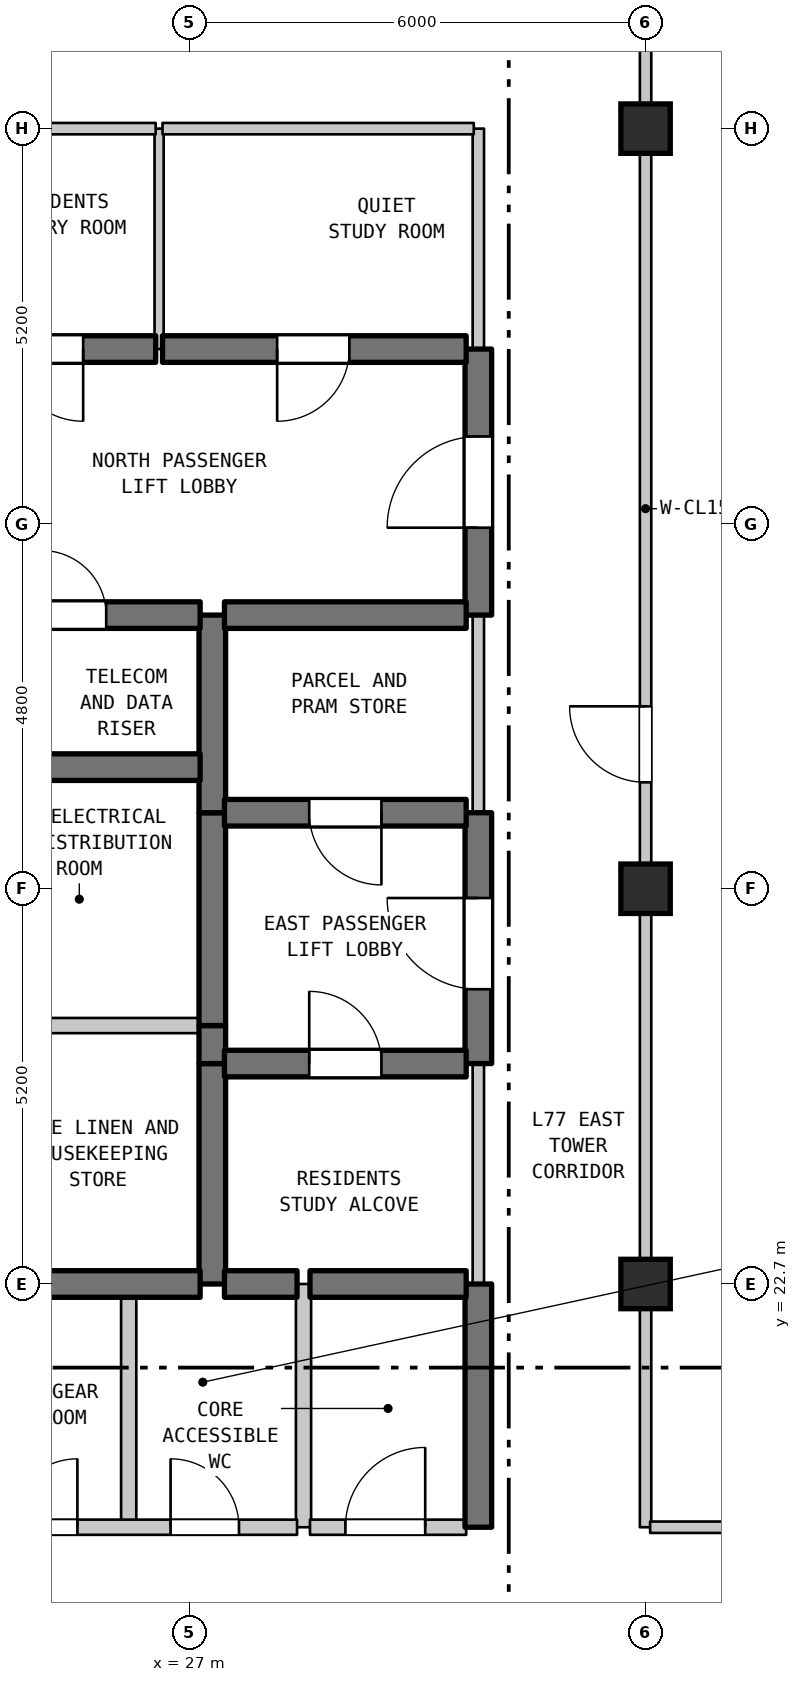
"""IFC4 building model, lengths in metres.
Left out: names, types, materials, properties, quantities, classifications, styles, units other than length and angle.
Written with IfcOpenShell. Run it as: python <this file> out.ifc"""

import sys

from ifc_helpers import new_model, si_unit, direction, frame, frame_2d, origin, origin_2d, place, context, subcontext, project, spatial, rectangle, extrude, element, fill, save


model = new_model("IFC4")
c1 = context("Model", 3, precision=1e-05, world=origin(), true_north=direction((0.0, 1.0)))
c2 = subcontext(c1, "Body", "Model", "MODEL_VIEW")
j1 = project(units=[si_unit("LENGTHUNIT", "METRE"), si_unit("PLANEANGLEUNIT", "RADIAN")], contexts=[c1])
p1 = place(None, origin())
s1 = spatial("IfcSite", under=j1, at=p1, CompositionType="ELEMENT")
p2 = place(p1, origin())
s2 = spatial("IfcBuilding", under=s1, at=p2, CompositionType="ELEMENT")
p3 = place(p2, frame((0.0, 0.0, 307.3)))
s3 = spatial("IfcBuildingStorey", under=s2, at=p3, CompositionType="ELEMENT", Elevation=307.3)
for number, where, z_axis, x_axis in (
    (1, (33.0, 22.7, 0.0), (0.0, 0.0, 1.0), (1.0, 0.0, 0.0)),
    (2, (33.0, 27.9, 0.0), (0.0, 0.0, 1.0), (1.0, 0.0, 0.0)),
    (3, (33.0, 37.9, 0.0), (0.0, 0.0, 1.0), (1.0, 0.0, 0.0)),
):
    element("IfcColumn", number, at=place(p3, frame(where, z_axis=z_axis, x_axis=x_axis)), inside=s3, PredefinedType="COLUMN", context=c2, shape_type="SweptSolid", body=[
        extrude(rectangle(XDim=0.65, YDim=0.65, at=origin_2d()), origin(), (0.0, 0.0, 1.0), 3.7),
    ])
p4 = place(p3, frame((26.2, 19.5, 0.0), z_axis=(0.0, 0.0, 1.0), x_axis=(0.0, 1.0, 0.0)))
e4 = element("IfcWall", 4, at=p4, inside=s3, PredefinedType="STANDARD", context=c2, shape_type="SweptSolid", body=[
    extrude(rectangle(XDim=3.2, YDim=0.2, at=frame_2d((1.6, 0.0))), origin(), (0.0, 0.0, 1.0), 3.39),
])
p5 = place(p3, frame((26.6, 35.0, 0.0), z_axis=(0.0, 0.0, 1.0), x_axis=(0.0, 1.0, 0.0)))
e5 = element("IfcWall", 5, at=p5, inside=s3, PredefinedType="PARTITIONING", context=c2, shape_type="SweptSolid", body=[
    extrude(rectangle(XDim=2.9, YDim=0.12, at=frame_2d((1.45, 0.0))), origin(), (0.0, 0.0, 1.0), 3.39),
])
p6 = place(p3, frame((27.3, 22.7, 0.0), z_axis=(0.0, 0.0, 1.0), x_axis=(0.0, 1.0, 0.0)))
e6 = element("IfcWall", 6, at=p6, inside=s3, PredefinedType="SHEAR", context=c2, shape_type="SweptSolid", body=[
    extrude(rectangle(XDim=2.9, YDim=0.35, at=frame_2d((1.45, 0.0))), origin(), (0.0, 0.0, 1.0), 3.39),
])
p7 = place(p3, frame((27.3, 25.6, 0.0), z_axis=(0.0, 0.0, 1.0), x_axis=(0.0, 1.0, 0.0)))
e7 = element("IfcWall", 7, at=p7, inside=s3, PredefinedType="SHEAR", context=c2, shape_type="SweptSolid", body=[
    extrude(rectangle(XDim=0.5, YDim=0.35, at=frame_2d((0.25, 0.0))), origin(), (0.0, 0.0, 1.0), 3.39),
])
p8 = place(p3, frame((27.3, 26.1, 0.0), z_axis=(0.0, 0.0, 1.0), x_axis=(0.0, 1.0, 0.0)))
e8 = element("IfcWall", 8, at=p8, inside=s3, PredefinedType="SHEAR", context=c2, shape_type="SweptSolid", body=[
    extrude(rectangle(XDim=2.8, YDim=0.35, at=frame_2d((1.4, 0.0))), origin(), (0.0, 0.0, 1.0), 3.39),
])
p9 = place(p3, frame((27.3, 28.9, 0.0), z_axis=(0.0, 0.0, 1.0), x_axis=(0.0, 1.0, 0.0)))
e9 = element("IfcWall", 9, at=p9, inside=s3, PredefinedType="SHEAR", context=c2, shape_type="SweptSolid", body=[
    extrude(rectangle(XDim=2.6, YDim=0.35, at=frame_2d((1.3, 0.0))), origin(), (0.0, 0.0, 1.0), 3.39),
])
p10 = place(p3, frame((28.5, 19.5, 0.0), z_axis=(0.0, 0.0, 1.0), x_axis=(0.0, 1.0, 0.0)))
e10 = element("IfcWall", 10, at=p10, inside=s3, PredefinedType="STANDARD", context=c2, shape_type="SweptSolid", body=[
    extrude(rectangle(XDim=3.2, YDim=0.2, at=frame_2d((1.6, 0.0))), origin(), (0.0, 0.0, 1.0), 3.39),
])
p11 = place(p3, frame((30.8, 19.5, 0.0), z_axis=(0.0, 0.0, 1.0), x_axis=(0.0, 1.0, 0.0)))
e11 = element("IfcWall", 11, at=p11, inside=s3, PredefinedType="SHEAR", context=c2, shape_type="SweptSolid", body=[
    extrude(rectangle(XDim=3.2, YDim=0.35, at=frame_2d((1.6, 0.0))), origin(), (0.0, 0.0, 1.0), 3.39),
])
p12 = place(p3, frame((30.8, 22.7, 0.0), z_axis=(0.0, 0.0, 1.0), x_axis=(0.0, 1.0, 0.0)))
e12 = element("IfcWall", 12, at=p12, inside=s3, PredefinedType="STANDARD", context=c2, shape_type="SweptSolid", body=[
    extrude(rectangle(XDim=2.9, YDim=0.15, at=frame_2d((1.45, 0.0))), origin(), (0.0, 0.0, 1.0), 3.39),
])
p13 = place(p3, frame((30.8, 25.6, 0.0), z_axis=(0.0, 0.0, 1.0), x_axis=(0.0, 1.0, 0.0)))
e13 = element("IfcWall", 13, at=p13, inside=s3, PredefinedType="SHEAR", context=c2, shape_type="SweptSolid", body=[
    extrude(rectangle(XDim=3.3, YDim=0.35, at=frame_2d((1.65, 0.0))), origin(), (0.0, 0.0, 1.0), 3.39),
])
p14 = place(p13, frame((0.978, 0.0, 0.0)))
e14 = element("IfcOpeningElement", 14, at=p14, cuts=e13, PredefinedType="OPENING", context=c2, shape_type="SweptSolid", body=[
    extrude(rectangle(XDim=1.2, YDim=2.2, at=frame_2d((0.6, 1.1))), frame((0.0, 0.185, 0.0), z_axis=(0.0, -1.0, 0.0), x_axis=(1.0, 0.0, 0.0)), (0.0, 0.0, 1.0), 0.37),
])
p15 = place(p3, frame((30.8, 28.9, 0.0), z_axis=(0.0, 0.0, 1.0), x_axis=(0.0, 1.0, 0.0)))
e15 = element("IfcWall", 15, at=p15, inside=s3, PredefinedType="STANDARD", context=c2, shape_type="SweptSolid", body=[
    extrude(rectangle(XDim=2.6, YDim=0.15, at=frame_2d((1.3, 0.0))), origin(), (0.0, 0.0, 1.0), 3.39),
])
p16 = place(p3, frame((30.8, 31.5, 0.0), z_axis=(0.0, 0.0, 1.0), x_axis=(0.0, 1.0, 0.0)))
e16 = element("IfcWall", 16, at=p16, inside=s3, PredefinedType="SHEAR", context=c2, shape_type="SweptSolid", body=[
    extrude(rectangle(XDim=3.5, YDim=0.35, at=frame_2d((1.75, 0.0))), origin(), (0.0, 0.0, 1.0), 3.39),
])
p17 = place(p16, frame((1.15, 0.0, 0.0)))
e17 = element("IfcOpeningElement", 17, at=p17, cuts=e16, PredefinedType="OPENING", context=c2, shape_type="SweptSolid", body=[
    extrude(rectangle(XDim=1.2, YDim=2.2, at=frame_2d((0.6, 1.1))), frame((0.0, 0.185, 0.0), z_axis=(0.0, -1.0, 0.0), x_axis=(1.0, 0.0, 0.0)), (0.0, 0.0, 1.0), 0.37),
])
p18 = place(p3, frame((30.8, 35.0, 0.0), z_axis=(0.0, 0.0, 1.0), x_axis=(0.0, 1.0, 0.0)))
e18 = element("IfcWall", 18, at=p18, inside=s3, PredefinedType="STANDARD", context=c2, shape_type="SweptSolid", body=[
    extrude(rectangle(XDim=2.9, YDim=0.15, at=frame_2d((1.45, 0.0))), origin(), (0.0, 0.0, 1.0), 3.39),
])
p19 = place(p3, frame((33.0, 19.5, 0.0), z_axis=(0.0, 0.0, 1.0), x_axis=(0.0, 1.0, 0.0)))
e19 = element("IfcWall", 19, at=p19, inside=s3, PredefinedType="STANDARD", context=c2, shape_type="SweptSolid", body=[
    extrude(rectangle(XDim=8.4, YDim=0.15, at=frame_2d((4.2, 0.0))), origin(), (0.0, 0.0, 1.0), 3.1),
])
p20 = place(p3, frame((23.96, 19.5, 0.0), z_axis=(0.0, 0.0, 1.0), x_axis=(1.0, 0.0, 0.0)))
e20 = element("IfcWall", 20, at=p20, inside=s3, PredefinedType="STANDARD", context=c2, shape_type="SweptSolid", body=[
    extrude(rectangle(XDim=4.455, YDim=0.2, at=frame_2d((2.228, 0.0))), origin(), (0.0, 0.0, 1.0), 3.39),
])
p21 = place(p20, frame((0.665, 0.0, 0.0)))
e21 = element("IfcOpeningElement", 21, at=p21, cuts=e20, PredefinedType="OPENING", context=c2, shape_type="SweptSolid", body=[
    extrude(rectangle(XDim=0.9, YDim=2.15, at=frame_2d((0.45, 1.075))), frame((0.0, 0.11, 0.0), z_axis=(0.0, -1.0, 0.0), x_axis=(1.0, 0.0, 0.0)), (0.0, 0.0, 1.0), 0.22),
])
p22 = place(p20, frame((2.791, 0.0, 0.0)))
e22 = element("IfcOpeningElement", 22, at=p22, cuts=e20, PredefinedType="OPENING", context=c2, shape_type="SweptSolid", body=[
    extrude(rectangle(XDim=0.9, YDim=2.15, at=frame_2d((0.45, 1.075))), frame((0.0, 0.11, 0.0), z_axis=(0.0, -1.0, 0.0), x_axis=(1.0, 0.0, 0.0)), (0.0, 0.0, 1.0), 0.22),
])
p23 = place(p3, frame((28.585, 19.5, 0.0), z_axis=(0.0, 0.0, 1.0), x_axis=(1.0, 0.0, 0.0)))
e23 = element("IfcWall", 23, at=p23, inside=s3, PredefinedType="STANDARD", context=c2, shape_type="SweptSolid", body=[
    extrude(rectangle(XDim=2.055, YDim=0.2, at=frame_2d((1.027, 0.0))), origin(), (0.0, 0.0, 1.0), 3.39),
])
p24 = place(p23, frame((0.466, 0.0, 0.0)))
e24 = element("IfcOpeningElement", 24, at=p24, cuts=e23, PredefinedType="OPENING", context=c2, shape_type="SweptSolid", body=[
    extrude(rectangle(XDim=1.05, YDim=2.15, at=frame_2d((0.525, 1.075))), frame((0.0, 0.11, 0.0), z_axis=(0.0, -1.0, 0.0), x_axis=(1.0, 0.0, 0.0)), (0.0, 0.0, 1.0), 0.22),
])
p25 = place(p3, frame((33.06, 19.5, 0.0), z_axis=(0.0, 0.0, 1.0), x_axis=(1.0, 0.0, 0.0)))
e25 = element("IfcWall", 25, at=p25, inside=s3, PredefinedType="STANDARD", context=c2, shape_type="SweptSolid", body=[
    extrude(rectangle(XDim=8.323, YDim=0.15, at=frame_2d((4.162, 0.0))), origin(), (0.0, 0.0, 1.0), 3.39),
])
p26 = place(p25, frame((3.583, 0.0, 0.0)))
e26 = element("IfcOpeningElement", 26, at=p26, cuts=e25, PredefinedType="OPENING", context=c2, shape_type="SweptSolid", body=[
    extrude(rectangle(XDim=1.0, YDim=2.15, at=frame_2d((0.5, 1.075))), frame((0.0, 0.085, 0.0), z_axis=(0.0, -1.0, 0.0), x_axis=(1.0, 0.0, 0.0)), (0.0, 0.0, 1.0), 0.17),
])
p27 = place(p3, frame((23.96, 22.7, 0.0), z_axis=(0.0, 0.0, 1.0), x_axis=(1.0, 0.0, 0.0)))
e27 = element("IfcWall", 27, at=p27, inside=s3, PredefinedType="SHEAR", context=c2, shape_type="SweptSolid", body=[
    extrude(rectangle(XDim=3.18, YDim=0.35, at=frame_2d((1.59, 0.0))), origin(), (0.0, 0.0, 1.0), 3.39),
])
p28 = place(p3, frame((27.46, 22.7, 0.0), z_axis=(0.0, 0.0, 1.0), x_axis=(1.0, 0.0, 0.0)))
e28 = element("IfcWall", 28, at=p28, inside=s3, PredefinedType="SHEAR", context=c2, shape_type="SweptSolid", body=[
    extrude(rectangle(XDim=0.955, YDim=0.35, at=frame_2d((0.478, 0.0))), origin(), (0.0, 0.0, 1.0), 3.39),
])
p29 = place(p3, frame((28.585, 22.7, 0.0), z_axis=(0.0, 0.0, 1.0), x_axis=(1.0, 0.0, 0.0)))
e29 = element("IfcWall", 29, at=p29, inside=s3, PredefinedType="SHEAR", context=c2, shape_type="SweptSolid", body=[
    extrude(rectangle(XDim=2.055, YDim=0.35, at=frame_2d((1.027, 0.0))), origin(), (0.0, 0.0, 1.0), 3.39),
])
p30 = place(p3, frame((27.46, 25.6, 0.0), z_axis=(0.0, 0.0, 1.0), x_axis=(1.0, 0.0, 0.0)))
e30 = element("IfcWall", 30, at=p30, inside=s3, PredefinedType="SHEAR", context=c2, shape_type="SweptSolid", body=[
    extrude(rectangle(XDim=3.18, YDim=0.35, at=frame_2d((1.59, 0.0))), origin(), (0.0, 0.0, 1.0), 3.39),
])
p31 = place(p30, frame((1.115, 0.0, 0.0)))
e31 = element("IfcOpeningElement", 31, at=p31, cuts=e30, PredefinedType="OPENING", context=c2, shape_type="SweptSolid", body=[
    extrude(rectangle(XDim=0.95, YDim=2.15, at=frame_2d((0.475, 1.075))), frame((0.0, 0.185, 0.0), z_axis=(0.0, -1.0, 0.0), x_axis=(1.0, 0.0, 0.0)), (0.0, 0.0, 1.0), 0.37),
])
p32 = place(p3, frame((23.96, 26.1, 0.0), z_axis=(0.0, 0.0, 1.0), x_axis=(1.0, 0.0, 0.0)))
e32 = element("IfcWall", 32, at=p32, inside=s3, PredefinedType="STANDARD", context=c2, shape_type="SweptSolid", body=[
    extrude(rectangle(XDim=3.18, YDim=0.2, at=frame_2d((1.59, 0.0))), origin(), (0.0, 0.0, 1.0), 3.39),
])
p33 = place(p3, frame((27.46, 28.9, 0.0), z_axis=(0.0, 0.0, 1.0), x_axis=(1.0, 0.0, 0.0)))
e33 = element("IfcWall", 33, at=p33, inside=s3, PredefinedType="SHEAR", context=c2, shape_type="SweptSolid", body=[
    extrude(rectangle(XDim=3.18, YDim=0.35, at=frame_2d((1.59, 0.0))), origin(), (0.0, 0.0, 1.0), 3.39),
])
p34 = place(p33, frame((1.115, 0.0, 0.0)))
e34 = element("IfcOpeningElement", 34, at=p34, cuts=e33, PredefinedType="OPENING", context=c2, shape_type="SweptSolid", body=[
    extrude(rectangle(XDim=0.95, YDim=2.15, at=frame_2d((0.475, 1.075))), frame((0.0, 0.185, 0.0), z_axis=(0.0, -1.0, 0.0), x_axis=(1.0, 0.0, 0.0)), (0.0, 0.0, 1.0), 0.37),
])
p35 = place(p3, frame((23.96, 29.5, 0.0), z_axis=(0.0, 0.0, 1.0), x_axis=(1.0, 0.0, 0.0)))
e35 = element("IfcWall", 35, at=p35, inside=s3, PredefinedType="SHEAR", context=c2, shape_type="SweptSolid", body=[
    extrude(rectangle(XDim=3.18, YDim=0.35, at=frame_2d((1.59, 0.0))), origin(), (0.0, 0.0, 1.0), 3.39),
])
p36 = place(p3, frame((23.96, 31.5, 0.0), z_axis=(0.0, 0.0, 1.0), x_axis=(1.0, 0.0, 0.0)))
e36 = element("IfcWall", 36, at=p36, inside=s3, PredefinedType="SHEAR", context=c2, shape_type="SweptSolid", body=[
    extrude(rectangle(XDim=3.18, YDim=0.35, at=frame_2d((1.59, 0.0))), origin(), (0.0, 0.0, 1.0), 3.39),
])
p37 = place(p36, frame((1.094, 0.0, 0.0)))
e37 = element("IfcOpeningElement", 37, at=p37, cuts=e36, PredefinedType="OPENING", context=c2, shape_type="SweptSolid", body=[
    extrude(rectangle(XDim=0.85, YDim=2.1, at=frame_2d((0.425, 1.05))), frame((0.0, 0.185, 0.0), z_axis=(0.0, -1.0, 0.0), x_axis=(1.0, 0.0, 0.0)), (0.0, 0.0, 1.0), 0.37),
])
p38 = place(p3, frame((27.46, 31.5, 0.0), z_axis=(0.0, 0.0, 1.0), x_axis=(1.0, 0.0, 0.0)))
e38 = element("IfcWall", 38, at=p38, inside=s3, PredefinedType="SHEAR", context=c2, shape_type="SweptSolid", body=[
    extrude(rectangle(XDim=3.18, YDim=0.35, at=frame_2d((1.59, 0.0))), origin(), (0.0, 0.0, 1.0), 3.39),
])
p39 = place(p3, frame((23.96, 35.0, 0.0), z_axis=(0.0, 0.0, 1.0), x_axis=(1.0, 0.0, 0.0)))
e39 = element("IfcWall", 39, at=p39, inside=s3, PredefinedType="SHEAR", context=c2, shape_type="SweptSolid", body=[
    extrude(rectangle(XDim=2.595, YDim=0.35, at=frame_2d((1.297, 0.0))), origin(), (0.0, 0.0, 1.0), 3.39),
])
p40 = place(p39, frame((0.691, 0.0, 0.0)))
e40 = element("IfcOpeningElement", 40, at=p40, cuts=e39, PredefinedType="OPENING", context=c2, shape_type="SweptSolid", body=[
    extrude(rectangle(XDim=0.95, YDim=2.15, at=frame_2d((0.475, 1.075))), frame((0.0, 0.185, 0.0), z_axis=(0.0, -1.0, 0.0), x_axis=(1.0, 0.0, 0.0)), (0.0, 0.0, 1.0), 0.37),
])
p41 = place(p3, frame((26.645, 35.0, 0.0), z_axis=(0.0, 0.0, 1.0), x_axis=(1.0, 0.0, 0.0)))
e41 = element("IfcWall", 41, at=p41, inside=s3, PredefinedType="SHEAR", context=c2, shape_type="SweptSolid", body=[
    extrude(rectangle(XDim=3.995, YDim=0.35, at=frame_2d((1.998, 0.0))), origin(), (0.0, 0.0, 1.0), 3.39),
])
p42 = place(p41, frame((1.508, 0.0, 0.0)))
e42 = element("IfcOpeningElement", 42, at=p42, cuts=e41, PredefinedType="OPENING", context=c2, shape_type="SweptSolid", body=[
    extrude(rectangle(XDim=0.95, YDim=2.15, at=frame_2d((0.475, 1.075))), frame((0.0, 0.185, 0.0), z_axis=(0.0, -1.0, 0.0), x_axis=(1.0, 0.0, 0.0)), (0.0, 0.0, 1.0), 0.37),
])
p43 = place(p3, frame((23.96, 37.9, 0.0), z_axis=(0.0, 0.0, 1.0), x_axis=(1.0, 0.0, 0.0)))
e43 = element("IfcWall", 43, at=p43, inside=s3, PredefinedType="STANDARD", context=c2, shape_type="SweptSolid", body=[
    extrude(rectangle(XDim=2.595, YDim=0.15, at=frame_2d((1.297, 0.0))), origin(), (0.0, 0.0, 1.0), 2.89),
])
p44 = place(p3, frame((26.645, 37.9, 0.0), z_axis=(0.0, 0.0, 1.0), x_axis=(1.0, 0.0, 0.0)))
e44 = element("IfcWall", 44, at=p44, inside=s3, PredefinedType="STANDARD", context=c2, shape_type="SweptSolid", body=[
    extrude(rectangle(XDim=4.095, YDim=0.15, at=frame_2d((2.047, 0.0))), origin(), (0.0, 0.0, 1.0), 2.89),
])
p45 = place(p3, frame((33.0, 27.9, 0.0), z_axis=(0.0, 0.0, 1.0), x_axis=(0.0, 1.0, 0.0)))
e45 = element("IfcWall", 45, at=p45, inside=s3, PredefinedType="STANDARD", context=c2, shape_type="SweptSolid", body=[
    extrude(rectangle(XDim=10.0, YDim=0.15, at=frame_2d((5.0, 0.0))), origin(), (0.0, 0.0, 1.0), 2.89),
])
p46 = place(p45, frame((1.4, 0.0, 0.0)))
e46 = element("IfcOpeningElement", 46, at=p46, cuts=e45, PredefinedType="OPENING", context=c2, shape_type="SweptSolid", body=[
    extrude(rectangle(XDim=1.0, YDim=2.15, at=frame_2d((0.5, 1.075))), frame((0.0, 0.085, 0.0), z_axis=(0.0, -1.0, 0.0), x_axis=(1.0, 0.0, 0.0)), (0.0, 0.0, 1.0), 0.17),
])
p47 = place(p3, frame((33.0, 37.9, 0.0), z_axis=(0.0, 0.0, 1.0), x_axis=(0.0, 1.0, 0.0)))
e47 = element("IfcWall", 47, at=p47, inside=s3, PredefinedType="STANDARD", context=c2, shape_type="SweptSolid", body=[
    extrude(rectangle(XDim=2.2, YDim=0.15, at=frame_2d((1.1, 0.0))), origin(), (0.0, 0.0, 1.0), 2.79),
])
p48 = place(p14, origin())
e48 = element("IfcDoor", 48, at=p48, inside=s3, OperationType="SINGLE_SWING_RIGHT", PredefinedType="DOOR", context=c2, shape_type="SweptSolid", body=[
    extrude(rectangle(XDim=1.2, YDim=2.2, at=frame_2d((0.6, 1.1))), frame((0.0, 0.025, 0.0), z_axis=(0.0, -1.0, 0.0), x_axis=(1.0, 0.0, 0.0)), (0.0, 0.0, 1.0), 0.05),
])
fill(e14, e48)
p49 = place(p17, origin())
e49 = element("IfcDoor", 49, at=p49, inside=s3, OperationType="SINGLE_SWING_LEFT", PredefinedType="DOOR", context=c2, shape_type="SweptSolid", body=[
    extrude(rectangle(XDim=1.2, YDim=2.2, at=frame_2d((0.6, 1.1))), frame((0.0, 0.025, 0.0), z_axis=(0.0, -1.0, 0.0), x_axis=(1.0, 0.0, 0.0)), (0.0, 0.0, 1.0), 0.05),
])
fill(e17, e49)
p50 = place(p46, origin())
e50 = element("IfcDoor", 50, at=p50, inside=s3, OperationType="SINGLE_SWING_RIGHT", PredefinedType="DOOR", context=c2, shape_type="SweptSolid", body=[
    extrude(rectangle(XDim=1.0, YDim=2.15, at=frame_2d((0.5, 1.075))), frame((0.0, 0.025, 0.0), z_axis=(0.0, -1.0, 0.0), x_axis=(1.0, 0.0, 0.0)), (0.0, 0.0, 1.0), 0.05),
])
fill(e46, e50)
p51 = place(p21, origin())
e51 = element("IfcDoor", 51, at=p51, inside=s3, OperationType="SINGLE_SWING_RIGHT", PredefinedType="DOOR", context=c2, shape_type="SweptSolid", body=[
    extrude(rectangle(XDim=0.9, YDim=2.15, at=frame_2d((0.45, 1.075))), frame((0.0, 0.025, 0.0), z_axis=(0.0, -1.0, 0.0), x_axis=(1.0, 0.0, 0.0)), (0.0, 0.0, 1.0), 0.05),
])
fill(e21, e51)
p52 = place(p22, origin())
e52 = element("IfcDoor", 52, at=p52, inside=s3, OperationType="SINGLE_SWING_LEFT", PredefinedType="DOOR", context=c2, shape_type="SweptSolid", body=[
    extrude(rectangle(XDim=0.9, YDim=2.15, at=frame_2d((0.45, 1.075))), frame((0.0, 0.025, 0.0), z_axis=(0.0, -1.0, 0.0), x_axis=(1.0, 0.0, 0.0)), (0.0, 0.0, 1.0), 0.05),
])
fill(e22, e52)
p53 = place(p24, origin())
e53 = element("IfcDoor", 53, at=p53, inside=s3, OperationType="SINGLE_SWING_RIGHT", PredefinedType="DOOR", context=c2, shape_type="SweptSolid", body=[
    extrude(rectangle(XDim=1.05, YDim=2.15, at=frame_2d((0.525, 1.075))), frame((0.0, 0.025, 0.0), z_axis=(0.0, -1.0, 0.0), x_axis=(1.0, 0.0, 0.0)), (0.0, 0.0, 1.0), 0.05),
])
fill(e24, e53)
p54 = place(p31, origin())
e54 = element("IfcDoor", 54, at=p54, inside=s3, OperationType="SINGLE_SWING_LEFT", PredefinedType="DOOR", context=c2, shape_type="SweptSolid", body=[
    extrude(rectangle(XDim=0.95, YDim=2.15, at=frame_2d((0.475, 1.075))), frame((0.0, 0.025, 0.0), z_axis=(0.0, -1.0, 0.0), x_axis=(1.0, 0.0, 0.0)), (0.0, 0.0, 1.0), 0.05),
])
fill(e31, e54)
p55 = place(p34, frame((0.95, 0.0, 0.0), z_axis=(0.0, 0.0, 1.0), x_axis=(-1.0, 0.0, 0.0)))
e55 = element("IfcDoor", 55, at=p55, inside=s3, OperationType="SINGLE_SWING_RIGHT", PredefinedType="DOOR", context=c2, shape_type="SweptSolid", body=[
    extrude(rectangle(XDim=0.95, YDim=2.15, at=frame_2d((0.475, 1.075))), frame((0.0, 0.025, 0.0), z_axis=(0.0, -1.0, 0.0), x_axis=(1.0, 0.0, 0.0)), (0.0, 0.0, 1.0), 0.05),
])
fill(e34, e55)
p56 = place(p37, origin())
e56 = element("IfcDoor", 56, at=p56, inside=s3, OperationType="SINGLE_SWING_LEFT", PredefinedType="DOOR", context=c2, shape_type="SweptSolid", body=[
    extrude(rectangle(XDim=0.85, YDim=2.1, at=frame_2d((0.425, 1.05))), frame((0.0, 0.025, 0.0), z_axis=(0.0, -1.0, 0.0), x_axis=(1.0, 0.0, 0.0)), (0.0, 0.0, 1.0), 0.05),
])
fill(e37, e56)
p57 = place(p40, frame((0.95, 0.0, 0.0), z_axis=(0.0, 0.0, 1.0), x_axis=(-1.0, 0.0, 0.0)))
e57 = element("IfcDoor", 57, at=p57, inside=s3, OperationType="SINGLE_SWING_RIGHT", PredefinedType="DOOR", context=c2, shape_type="SweptSolid", body=[
    extrude(rectangle(XDim=0.95, YDim=2.15, at=frame_2d((0.475, 1.075))), frame((0.0, 0.025, 0.0), z_axis=(0.0, -1.0, 0.0), x_axis=(1.0, 0.0, 0.0)), (0.0, 0.0, 1.0), 0.05),
])
fill(e40, e57)
p58 = place(p42, frame((0.95, 0.0, 0.0), z_axis=(0.0, 0.0, 1.0), x_axis=(-1.0, 0.0, 0.0)))
e58 = element("IfcDoor", 58, at=p58, inside=s3, OperationType="SINGLE_SWING_LEFT", PredefinedType="DOOR", context=c2, shape_type="SweptSolid", body=[
    extrude(rectangle(XDim=0.95, YDim=2.15, at=frame_2d((0.475, 1.075))), frame((0.0, 0.025, 0.0), z_axis=(0.0, -1.0, 0.0), x_axis=(1.0, 0.0, 0.0)), (0.0, 0.0, 1.0), 0.05),
])
fill(e42, e58)
save(model, sys.argv[1])
